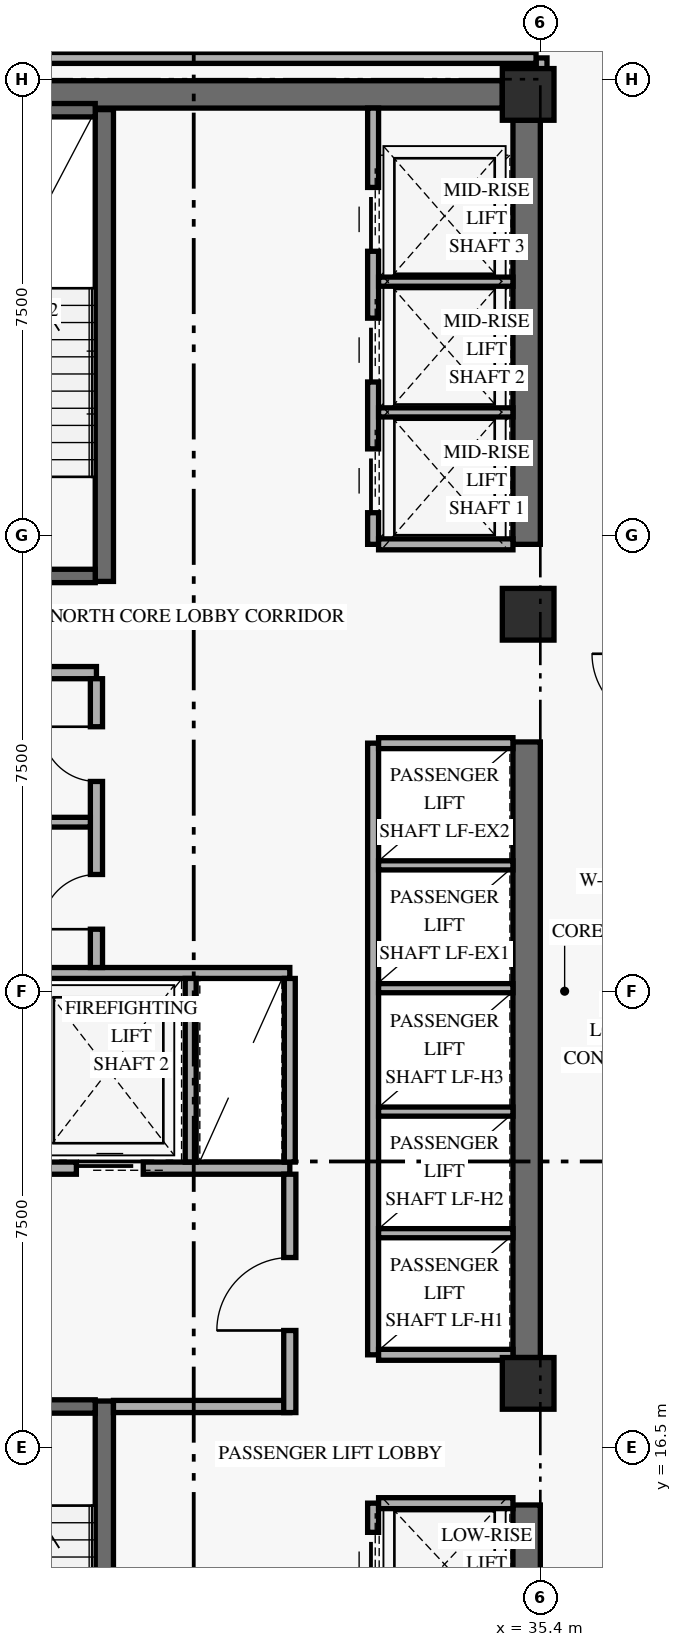
"""IFC4 building model, lengths in metres.
Left out: names, types, materials, properties, quantities, classifications, styles, units other than length and angle.
Written with IfcOpenShell. Run it as: python <this file> out.ifc"""

import sys

from ifc_helpers import new_model, si_unit, direction, frame, frame_2d, origin, origin_2d, place, context, subcontext, project, spatial, rectangle, extrude, element, fill, save


model = new_model("IFC4")
c1 = context("Model", 3, precision=1e-05, world=origin(), true_north=direction((0.0, 1.0)))
c2 = subcontext(c1, "Body", "Model", "MODEL_VIEW")
j1 = project(units=[si_unit("LENGTHUNIT", "METRE"), si_unit("PLANEANGLEUNIT", "RADIAN")], contexts=[c1])
p1 = place(None, origin())
s1 = spatial("IfcSite", under=j1, at=p1, CompositionType="ELEMENT")
p2 = place(p1, origin())
s2 = spatial("IfcBuilding", under=s1, at=p2, CompositionType="ELEMENT")
p3 = place(p2, frame((0.0, 0.0, 98.4)))
s3 = spatial("IfcBuildingStorey", under=s2, at=p3, CompositionType="ELEMENT", Elevation=98.4)
p4 = place(p3, frame((35.175, 9.675, 0.0), z_axis=(0.0, 0.0, 1.0), x_axis=(0.0, 1.0, 0.0)))
e1 = element("IfcWall", 1, at=p4, inside=s3, PredefinedType="SHEAR", context=c2, shape_type="SweptSolid", body=[
    extrude(rectangle(XDim=5.875, YDim=0.45, at=frame_2d((2.938, 0.0))), origin(), (0.0, 0.0, 1.0), 3.349),
])
p5 = place(p3, frame((35.175, 17.975, 0.0), z_axis=(0.0, 0.0, 1.0), x_axis=(0.0, 1.0, 0.0)))
e2 = element("IfcWall", 2, at=p5, inside=s3, PredefinedType="SHEAR", context=c2, shape_type="SweptSolid", body=[
    extrude(rectangle(XDim=10.125, YDim=0.45, at=frame_2d((5.062, 0.0))), origin(), (0.0, 0.0, 1.0), 3.349),
])
p6 = place(p3, frame((35.175, 31.35, 0.0), z_axis=(0.0, 0.0, 1.0), x_axis=(0.0, 1.0, 0.0)))
e3 = element("IfcWall", 3, at=p6, inside=s3, PredefinedType="SHEAR", context=c2, shape_type="SweptSolid", body=[
    extrude(rectangle(XDim=6.975, YDim=0.45, at=frame_2d((3.487, 0.0))), origin(), (0.0, 0.0, 1.0), 3.349),
])
p7 = place(p3, frame((24.625, 38.75, 0.0), z_axis=(0.0, 0.0, 1.0), x_axis=(1.0, 0.0, 0.0)))
e4 = element("IfcWall", 4, at=p7, inside=s3, PredefinedType="SHEAR", context=c2, shape_type="SweptSolid", body=[
    extrude(rectangle(XDim=10.15, YDim=0.45, at=frame_2d((5.075, 0.0))), origin(), (0.0, 0.0, 1.0), 3.96),
])
p8 = place(p3, frame((28.23, 9.5, 0.0), z_axis=(0.0, 0.0, 1.0), x_axis=(0.0, 1.0, 0.0)))
e5 = element("IfcWall", 5, at=p8, inside=s3, PredefinedType="SHEAR", context=c2, shape_type="SweptSolid", body=[
    extrude(rectangle(XDim=7.76, YDim=0.3, at=frame_2d((3.88, 0.0))), origin(), (0.0, 0.0, 1.0), 3.96),
])
p9 = place(p3, frame((24.92, 17.17, 0.0), z_axis=(0.0, 0.0, 1.0), x_axis=(1.0, 0.0, 0.0)))
e6 = element("IfcWall", 6, at=p9, inside=s3, PredefinedType="SHEAR", context=c2, shape_type="SweptSolid", body=[
    extrude(rectangle(XDim=3.16, YDim=0.22, at=frame_2d((1.58, 0.0))), origin(), (0.0, 0.0, 1.0), 3.96),
])
p10 = place(p9, frame((0.78, 0.0, 0.0)))
e7 = element("IfcOpeningElement", 7, at=p10, cuts=e6, PredefinedType="OPENING", context=c2, shape_type="SweptSolid", body=[
    extrude(rectangle(XDim=1.05, YDim=2.15, at=frame_2d((0.525, 1.075))), frame((0.0, 0.12, 0.0), z_axis=(0.0, -1.0, 0.0), x_axis=(1.0, 0.0, 0.0)), (0.0, 0.0, 1.0), 0.24),
])
p11 = place(p3, frame((28.23, 30.74, 0.0), z_axis=(0.0, 0.0, 1.0), x_axis=(0.0, 1.0, 0.0)))
e8 = element("IfcWall", 8, at=p11, inside=s3, PredefinedType="SHEAR", context=c2, shape_type="SweptSolid", body=[
    extrude(rectangle(XDim=7.76, YDim=0.3, at=frame_2d((3.88, 0.0))), origin(), (0.0, 0.0, 1.0), 3.96),
])
p12 = place(p3, frame((24.92, 30.83, 0.0), z_axis=(0.0, 0.0, 1.0), x_axis=(1.0, 0.0, 0.0)))
e9 = element("IfcWall", 9, at=p12, inside=s3, PredefinedType="SHEAR", context=c2, shape_type="SweptSolid", body=[
    extrude(rectangle(XDim=3.16, YDim=0.22, at=frame_2d((1.58, 0.0))), origin(), (0.0, 0.0, 1.0), 3.96),
])
p13 = place(p12, frame((0.78, 0.0, 0.0)))
e10 = element("IfcOpeningElement", 10, at=p13, cuts=e9, PredefinedType="OPENING", context=c2, shape_type="SweptSolid", body=[
    extrude(rectangle(XDim=1.05, YDim=2.15, at=frame_2d((0.525, 1.075))), frame((0.0, 0.12, 0.0), z_axis=(0.0, -1.0, 0.0), x_axis=(1.0, 0.0, 0.0)), (0.0, 0.0, 1.0), 0.24),
])
p14 = place(p3, frame((24.92, 38.49, 0.0), z_axis=(0.0, 0.0, 1.0), x_axis=(1.0, 0.0, 0.0)))
e11 = element("IfcWall", 11, at=p14, inside=s3, PredefinedType="SHEAR", context=c2, shape_type="SweptSolid", body=[
    extrude(rectangle(XDim=3.16, YDim=0.22, at=frame_2d((1.58, 0.0))), origin(), (0.0, 0.0, 1.0), 3.96),
])
for number, where, z_axis, x_axis in (
    (12, (35.2, 17.55, 0.0), (0.0, 0.0, 1.0), (1.0, 0.0, 0.0)),
    (13, (35.2, 30.2, 0.0), (0.0, 0.0, 1.0), (1.0, 0.0, 0.0)),
    (14, (35.2, 38.75, 0.0), (0.0, 0.0, 1.0), (1.0, 0.0, 0.0)),
):
    element("IfcColumn", number, at=place(p3, frame(where, z_axis=z_axis, x_axis=x_axis)), inside=s3, PredefinedType="COLUMN", context=c2, shape_type="SweptSolid", body=[
        extrude(rectangle(XDim=0.85, YDim=0.85, at=origin_2d()), origin(), (0.0, 0.0, 1.0), 4.2),
    ])
p15 = place(p3, frame((24.45, 21.09, 0.0), z_axis=(0.0, 0.0, 1.0), x_axis=(1.0, 0.0, 0.0)))
e15 = element("IfcWall", 15, at=p15, inside=s3, PredefinedType="STANDARD", context=c2, shape_type="SweptSolid", body=[
    extrude(rectangle(XDim=6.83, YDim=0.2, at=frame_2d((3.415, 0.0))), origin(), (0.0, 0.0, 1.0), 3.96),
])
p16 = place(p15, frame((0.72, 0.0, 0.0)))
e16 = element("IfcOpeningElement", 16, at=p16, cuts=e15, PredefinedType="OPENING", context=c2, shape_type="SweptSolid", body=[
    extrude(rectangle(XDim=1.1, YDim=2.2, at=frame_2d((0.55, 1.1))), frame((0.0, 0.11, 0.0), z_axis=(0.0, -1.0, 0.0), x_axis=(1.0, 0.0, 0.0)), (0.0, 0.0, 1.0), 0.22),
])
p17 = place(p15, frame((3.32, 0.0, 0.0)))
e17 = element("IfcOpeningElement", 17, at=p17, cuts=e15, PredefinedType="OPENING", context=c2, shape_type="SweptSolid", body=[
    extrude(rectangle(XDim=1.1, YDim=2.2, at=frame_2d((0.55, 1.1))), frame((0.0, 0.11, 0.0), z_axis=(0.0, -1.0, 0.0), x_axis=(1.0, 0.0, 0.0)), (0.0, 0.0, 1.0), 0.22),
])
p18 = place(p3, frame((28.38, 17.17, 0.0), z_axis=(0.0, 0.0, 1.0), x_axis=(1.0, 0.0, 0.0)))
e18 = element("IfcWall", 18, at=p18, inside=s3, PredefinedType="STANDARD", context=c2, shape_type="SweptSolid", body=[
    extrude(rectangle(XDim=2.9, YDim=0.2, at=frame_2d((1.45, 0.0))), origin(), (0.0, 0.0, 1.0), 3.96),
])
p19 = place(p3, frame((31.28, 17.07, 0.0), z_axis=(0.0, 0.0, 1.0), x_axis=(0.0, 1.0, 0.0)))
e19 = element("IfcWall", 19, at=p19, inside=s3, PredefinedType="STANDARD", context=c2, shape_type="SweptSolid", body=[
    extrude(rectangle(XDim=3.92, YDim=0.2, at=frame_2d((1.96, 0.0))), origin(), (0.0, 0.0, 1.0), 3.331),
])
p20 = place(p19, frame((1.35, 0.0, 0.0)))
e20 = element("IfcOpeningElement", 20, at=p20, cuts=e19, PredefinedType="OPENING", context=c2, shape_type="SweptSolid", body=[
    extrude(rectangle(XDim=1.2, YDim=2.15, at=frame_2d((0.6, 1.075))), frame((0.0, 0.11, 0.0), z_axis=(0.0, -1.0, 0.0), x_axis=(1.0, 0.0, 0.0)), (0.0, 0.0, 1.0), 0.22),
])
p21 = place(p3, frame((24.45, 24.3, 0.0), z_axis=(0.0, 0.0, 1.0), x_axis=(1.0, 0.0, 0.0)))
e21 = element("IfcWall", 21, at=p21, inside=s3, PredefinedType="STANDARD", context=c2, shape_type="SweptSolid", body=[
    extrude(rectangle(XDim=6.83, YDim=0.18, at=frame_2d((3.415, 0.0))), origin(), (0.0, 0.0, 1.0), 3.96),
])
for number, where, z_axis, x_axis in (
    (22, (29.65, 21.19, 0.0), (0.0, 0.0, 1.0), (0.0, 1.0, 0.0)),
    (23, (31.28, 21.19, 0.0), (0.0, 0.0, 1.0), (0.0, 1.0, 0.0)),
):
    element("IfcWall", number, at=place(p3, frame(where, z_axis=z_axis, x_axis=x_axis)), inside=s3, PredefinedType="STANDARD", context=c2, shape_type="SweptSolid", body=[
        extrude(rectangle(XDim=3.02, YDim=0.18, at=frame_2d((1.51, 0.0))), origin(), (0.0, 0.0, 1.0), 3.96),
    ])
p22 = place(p3, frame((24.45, 29.24, 0.0), z_axis=(0.0, 0.0, 1.0), x_axis=(1.0, 0.0, 0.0)))
e24 = element("IfcWall", 24, at=p22, inside=s3, PredefinedType="STANDARD", context=c2, shape_type="SweptSolid", body=[
    extrude(rectangle(XDim=3.65, YDim=0.2, at=frame_2d((1.825, 0.0))), origin(), (0.0, 0.0, 1.0), 3.96),
])
p23 = place(p3, frame((28.1, 24.39, 0.0), z_axis=(0.0, 0.0, 1.0), x_axis=(0.0, 1.0, 0.0)))
e25 = element("IfcWall", 25, at=p23, inside=s3, PredefinedType="STANDARD", context=c2, shape_type="SweptSolid", body=[
    extrude(rectangle(XDim=4.75, YDim=0.2, at=frame_2d((2.375, 0.0))), origin(), (0.0, 0.0, 1.0), 3.96),
])
p24 = place(p23, frame((0.63, 0.0, 0.0)))
e26 = element("IfcOpeningElement", 26, at=p24, cuts=e25, PredefinedType="OPENING", context=c2, shape_type="SweptSolid", body=[
    extrude(rectangle(XDim=0.9, YDim=2.1, at=frame_2d((0.45, 1.05))), frame((0.0, 0.11, 0.0), z_axis=(0.0, -1.0, 0.0), x_axis=(1.0, 0.0, 0.0)), (0.0, 0.0, 1.0), 0.22),
])
p25 = place(p23, frame((3.06, 0.0, 0.0)))
e27 = element("IfcOpeningElement", 27, at=p25, cuts=e25, PredefinedType="OPENING", context=c2, shape_type="SweptSolid", body=[
    extrude(rectangle(XDim=0.9, YDim=2.1, at=frame_2d((0.45, 1.05))), frame((0.0, 0.11, 0.0), z_axis=(0.0, -1.0, 0.0), x_axis=(1.0, 0.0, 0.0)), (0.0, 0.0, 1.0), 0.22),
])
p26 = place(p3, frame((24.45, 26.78, 0.0), z_axis=(0.0, 0.0, 1.0), x_axis=(1.0, 0.0, 0.0)))
e28 = element("IfcWall", 28, at=p26, inside=s3, PredefinedType="PARTITIONING", context=c2, shape_type="SweptSolid", body=[
    extrude(rectangle(XDim=3.55, YDim=0.16, at=frame_2d((1.775, 0.0))), origin(), (0.0, 0.0, 1.0), 3.96),
])
p27 = place(p3, frame((32.65, 9.5, 0.0), z_axis=(0.0, 0.0, 1.0), x_axis=(0.0, 1.0, 0.0)))
e29 = element("IfcWall", 29, at=p27, inside=s3, PredefinedType="STANDARD", context=c2, shape_type="SweptSolid", body=[
    extrude(rectangle(XDim=6.08, YDim=0.18, at=frame_2d((3.04, 0.0))), origin(), (0.0, 0.0, 1.0), 3.96),
])
p28 = place(p27, frame((0.55, 0.0, 0.0)))
e30 = element("IfcOpeningElement", 30, at=p28, cuts=e29, PredefinedType="OPENING", context=c2, shape_type="SweptSolid", body=[
    extrude(rectangle(XDim=1.05, YDim=2.2, at=frame_2d((0.525, 1.1))), frame((0.0, 0.1, 0.0), z_axis=(0.0, -1.0, 0.0), x_axis=(1.0, 0.0, 0.0)), (0.0, 0.0, 1.0), 0.2),
])
p29 = place(p27, frame((2.55, 0.0, 0.0)))
e31 = element("IfcOpeningElement", 31, at=p29, cuts=e29, PredefinedType="OPENING", context=c2, shape_type="SweptSolid", body=[
    extrude(rectangle(XDim=1.05, YDim=2.2, at=frame_2d((0.525, 1.1))), frame((0.0, 0.1, 0.0), z_axis=(0.0, -1.0, 0.0), x_axis=(1.0, 0.0, 0.0)), (0.0, 0.0, 1.0), 0.2),
])
p30 = place(p27, frame((4.55, 0.0, 0.0)))
e32 = element("IfcOpeningElement", 32, at=p30, cuts=e29, PredefinedType="OPENING", context=c2, shape_type="SweptSolid", body=[
    extrude(rectangle(XDim=1.05, YDim=2.2, at=frame_2d((0.525, 1.1))), frame((0.0, 0.1, 0.0), z_axis=(0.0, -1.0, 0.0), x_axis=(1.0, 0.0, 0.0)), (0.0, 0.0, 1.0), 0.2),
])
p31 = place(p3, frame((32.74, 15.58, 0.0), z_axis=(0.0, 0.0, 1.0), x_axis=(1.0, 0.0, 0.0)))
e33 = element("IfcWall", 33, at=p31, inside=s3, PredefinedType="STANDARD", context=c2, shape_type="SweptSolid", body=[
    extrude(rectangle(XDim=2.21, YDim=0.18, at=frame_2d((1.105, 0.0))), origin(), (0.0, 0.0, 1.0), 3.96),
])
p32 = place(p3, frame((32.65, 18.02, 0.0), z_axis=(0.0, 0.0, 1.0), x_axis=(0.0, 1.0, 0.0)))
e34 = element("IfcWall", 34, at=p32, inside=s3, PredefinedType="STANDARD", context=c2, shape_type="SweptSolid", body=[
    extrude(rectangle(XDim=10.06, YDim=0.18, at=frame_2d((5.03, 0.0))), origin(), (0.0, 0.0, 1.0), 3.96),
])
for number, where, z_axis, x_axis in (
    (35, (32.74, 18.02, 0.0), (0.0, 0.0, 1.0), (1.0, 0.0, 0.0)),
    (36, (32.74, 28.08, 0.0), (0.0, 0.0, 1.0), (1.0, 0.0, 0.0)),
):
    element("IfcWall", number, at=place(p3, frame(where, z_axis=z_axis, x_axis=x_axis)), inside=s3, PredefinedType="STANDARD", context=c2, shape_type="SweptSolid", body=[
        extrude(rectangle(XDim=2.21, YDim=0.18, at=frame_2d((1.105, 0.0))), origin(), (0.0, 0.0, 1.0), 3.96),
    ])
for number, where, z_axis, x_axis in (
    (37, (32.74, 20.02, 0.0), (0.0, 0.0, 1.0), (1.0, 0.0, 0.0)),
    (38, (32.74, 22.02, 0.0), (0.0, 0.0, 1.0), (1.0, 0.0, 0.0)),
    (39, (32.74, 24.05, 0.0), (0.0, 0.0, 1.0), (1.0, 0.0, 0.0)),
    (40, (32.74, 26.07, 0.0), (0.0, 0.0, 1.0), (1.0, 0.0, 0.0)),
):
    element("IfcWall", number, at=place(p3, frame(where, z_axis=z_axis, x_axis=x_axis)), inside=s3, PredefinedType="STANDARD", context=c2, shape_type="SweptSolid", body=[
        extrude(rectangle(XDim=2.21, YDim=0.15, at=frame_2d((1.105, 0.0))), origin(), (0.0, 0.0, 1.0), 3.96),
    ])
p33 = place(p3, frame((32.65, 31.35, 0.0), z_axis=(0.0, 0.0, 1.0), x_axis=(0.0, 1.0, 0.0)))
e41 = element("IfcWall", 41, at=p33, inside=s3, PredefinedType="STANDARD", context=c2, shape_type="SweptSolid", body=[
    extrude(rectangle(XDim=7.175, YDim=0.18, at=frame_2d((3.587, 0.0))), origin(), (0.0, 0.0, 1.0), 3.96),
])
p34 = place(p33, frame((0.52, 0.0, 0.0)))
e42 = element("IfcOpeningElement", 42, at=p34, cuts=e41, PredefinedType="OPENING", context=c2, shape_type="SweptSolid", body=[
    extrude(rectangle(XDim=1.05, YDim=2.2, at=frame_2d((0.525, 1.1))), frame((0.0, 0.1, 0.0), z_axis=(0.0, -1.0, 0.0), x_axis=(1.0, 0.0, 0.0)), (0.0, 0.0, 1.0), 0.2),
])
p35 = place(p33, frame((2.67, 0.0, 0.0)))
e43 = element("IfcOpeningElement", 43, at=p35, cuts=e41, PredefinedType="OPENING", context=c2, shape_type="SweptSolid", body=[
    extrude(rectangle(XDim=1.05, YDim=2.2, at=frame_2d((0.525, 1.1))), frame((0.0, 0.1, 0.0), z_axis=(0.0, -1.0, 0.0), x_axis=(1.0, 0.0, 0.0)), (0.0, 0.0, 1.0), 0.2),
])
p36 = place(p33, frame((4.82, 0.0, 0.0)))
e44 = element("IfcOpeningElement", 44, at=p36, cuts=e41, PredefinedType="OPENING", context=c2, shape_type="SweptSolid", body=[
    extrude(rectangle(XDim=1.05, YDim=2.2, at=frame_2d((0.525, 1.1))), frame((0.0, 0.1, 0.0), z_axis=(0.0, -1.0, 0.0), x_axis=(1.0, 0.0, 0.0)), (0.0, 0.0, 1.0), 0.2),
])
p37 = place(p3, frame((32.74, 31.35, 0.0), z_axis=(0.0, 0.0, 1.0), x_axis=(1.0, 0.0, 0.0)))
e45 = element("IfcWall", 45, at=p37, inside=s3, PredefinedType="STANDARD", context=c2, shape_type="SweptSolid", body=[
    extrude(rectangle(XDim=2.21, YDim=0.18, at=frame_2d((1.105, 0.0))), origin(), (0.0, 0.0, 1.0), 3.96),
])
for number, where, z_axis, x_axis in (
    (46, (32.74, 33.52, 0.0), (0.0, 0.0, 1.0), (1.0, 0.0, 0.0)),
    (47, (32.74, 35.67, 0.0), (0.0, 0.0, 1.0), (1.0, 0.0, 0.0)),
):
    element("IfcWall", number, at=place(p3, frame(where, z_axis=z_axis, x_axis=x_axis)), inside=s3, PredefinedType="STANDARD", context=c2, shape_type="SweptSolid", body=[
        extrude(rectangle(XDim=2.21, YDim=0.15, at=frame_2d((1.105, 0.0))), origin(), (0.0, 0.0, 1.0), 3.96),
    ])
p38 = place(p3, frame((35.42, 38.75, 0.0), z_axis=(0.0, 0.0, 1.0), x_axis=(0.0, 1.0, 0.0)))
e48 = element("IfcWall", 48, at=p38, inside=s3, PredefinedType="STANDARD", context=c2, shape_type="SweptSolid", body=[
    extrude(rectangle(XDim=0.6, YDim=0.18, at=frame_2d((0.3, 0.0))), origin(), (0.0, 0.0, 1.0), 3.331),
])
p39 = place(p3, frame((23.85, 39.35, 0.0), z_axis=(0.0, 0.0, 1.0), x_axis=(1.0, 0.0, 0.0)))
e49 = element("IfcWall", 49, at=p39, inside=s3, PredefinedType="STANDARD", context=c2, shape_type="SweptSolid", body=[
    extrude(rectangle(XDim=11.48, YDim=0.18, at=frame_2d((5.74, 0.0))), origin(), (0.0, 0.0, 1.0), 3.331),
])
p40 = place(p17, origin())
e50 = element("IfcDoor", 50, at=p40, inside=s3, OperationType="SLIDING_TO_LEFT", PredefinedType="DOOR", context=c2, shape_type="SweptSolid", body=[
    extrude(rectangle(XDim=1.1, YDim=2.2, at=frame_2d((0.55, 1.1))), frame((0.0, 0.025, 0.0), z_axis=(0.0, -1.0, 0.0), x_axis=(1.0, 0.0, 0.0)), (0.0, 0.0, 1.0), 0.05),
])
fill(e17, e50)
p41 = place(p20, origin())
e51 = element("IfcDoor", 51, at=p41, inside=s3, OperationType="SINGLE_SWING_LEFT", PredefinedType="DOOR", context=c2, shape_type="SweptSolid", body=[
    extrude(rectangle(XDim=1.2, YDim=2.15, at=frame_2d((0.6, 1.075))), frame((0.0, 0.025, 0.0), z_axis=(0.0, -1.0, 0.0), x_axis=(1.0, 0.0, 0.0)), (0.0, 0.0, 1.0), 0.05),
])
fill(e20, e51)
p42 = place(p24, origin())
e52 = element("IfcDoor", 52, at=p42, inside=s3, OperationType="SINGLE_SWING_LEFT", PredefinedType="DOOR", context=c2, shape_type="SweptSolid", body=[
    extrude(rectangle(XDim=0.9, YDim=2.1, at=frame_2d((0.45, 1.05))), frame((0.0, 0.025, 0.0), z_axis=(0.0, -1.0, 0.0), x_axis=(1.0, 0.0, 0.0)), (0.0, 0.0, 1.0), 0.05),
])
fill(e26, e52)
p43 = place(p25, origin())
e53 = element("IfcDoor", 53, at=p43, inside=s3, OperationType="SINGLE_SWING_RIGHT", PredefinedType="DOOR", context=c2, shape_type="SweptSolid", body=[
    extrude(rectangle(XDim=0.9, YDim=2.1, at=frame_2d((0.45, 1.05))), frame((0.0, 0.025, 0.0), z_axis=(0.0, -1.0, 0.0), x_axis=(1.0, 0.0, 0.0)), (0.0, 0.0, 1.0), 0.05),
])
fill(e27, e53)
p44 = place(p30, origin())
e54 = element("IfcDoor", 54, at=p44, inside=s3, OperationType="SLIDING_TO_LEFT", PredefinedType="DOOR", context=c2, shape_type="SweptSolid", body=[
    extrude(rectangle(XDim=1.05, YDim=2.2, at=frame_2d((0.525, 1.1))), frame((0.0, 0.025, 0.0), z_axis=(0.0, -1.0, 0.0), x_axis=(1.0, 0.0, 0.0)), (0.0, 0.0, 1.0), 0.05),
])
fill(e32, e54)
p45 = place(p34, origin())
e55 = element("IfcDoor", 55, at=p45, inside=s3, OperationType="SLIDING_TO_LEFT", PredefinedType="DOOR", context=c2, shape_type="SweptSolid", body=[
    extrude(rectangle(XDim=1.05, YDim=2.2, at=frame_2d((0.525, 1.1))), frame((0.0, 0.025, 0.0), z_axis=(0.0, -1.0, 0.0), x_axis=(1.0, 0.0, 0.0)), (0.0, 0.0, 1.0), 0.05),
])
fill(e42, e55)
p46 = place(p35, origin())
e56 = element("IfcDoor", 56, at=p46, inside=s3, OperationType="SLIDING_TO_LEFT", PredefinedType="DOOR", context=c2, shape_type="SweptSolid", body=[
    extrude(rectangle(XDim=1.05, YDim=2.2, at=frame_2d((0.525, 1.1))), frame((0.0, 0.025, 0.0), z_axis=(0.0, -1.0, 0.0), x_axis=(1.0, 0.0, 0.0)), (0.0, 0.0, 1.0), 0.05),
])
fill(e43, e56)
p47 = place(p36, origin())
e57 = element("IfcDoor", 57, at=p47, inside=s3, OperationType="SLIDING_TO_LEFT", PredefinedType="DOOR", context=c2, shape_type="SweptSolid", body=[
    extrude(rectangle(XDim=1.05, YDim=2.2, at=frame_2d((0.525, 1.1))), frame((0.0, 0.025, 0.0), z_axis=(0.0, -1.0, 0.0), x_axis=(1.0, 0.0, 0.0)), (0.0, 0.0, 1.0), 0.05),
])
fill(e44, e57)
save(model, sys.argv[1])
